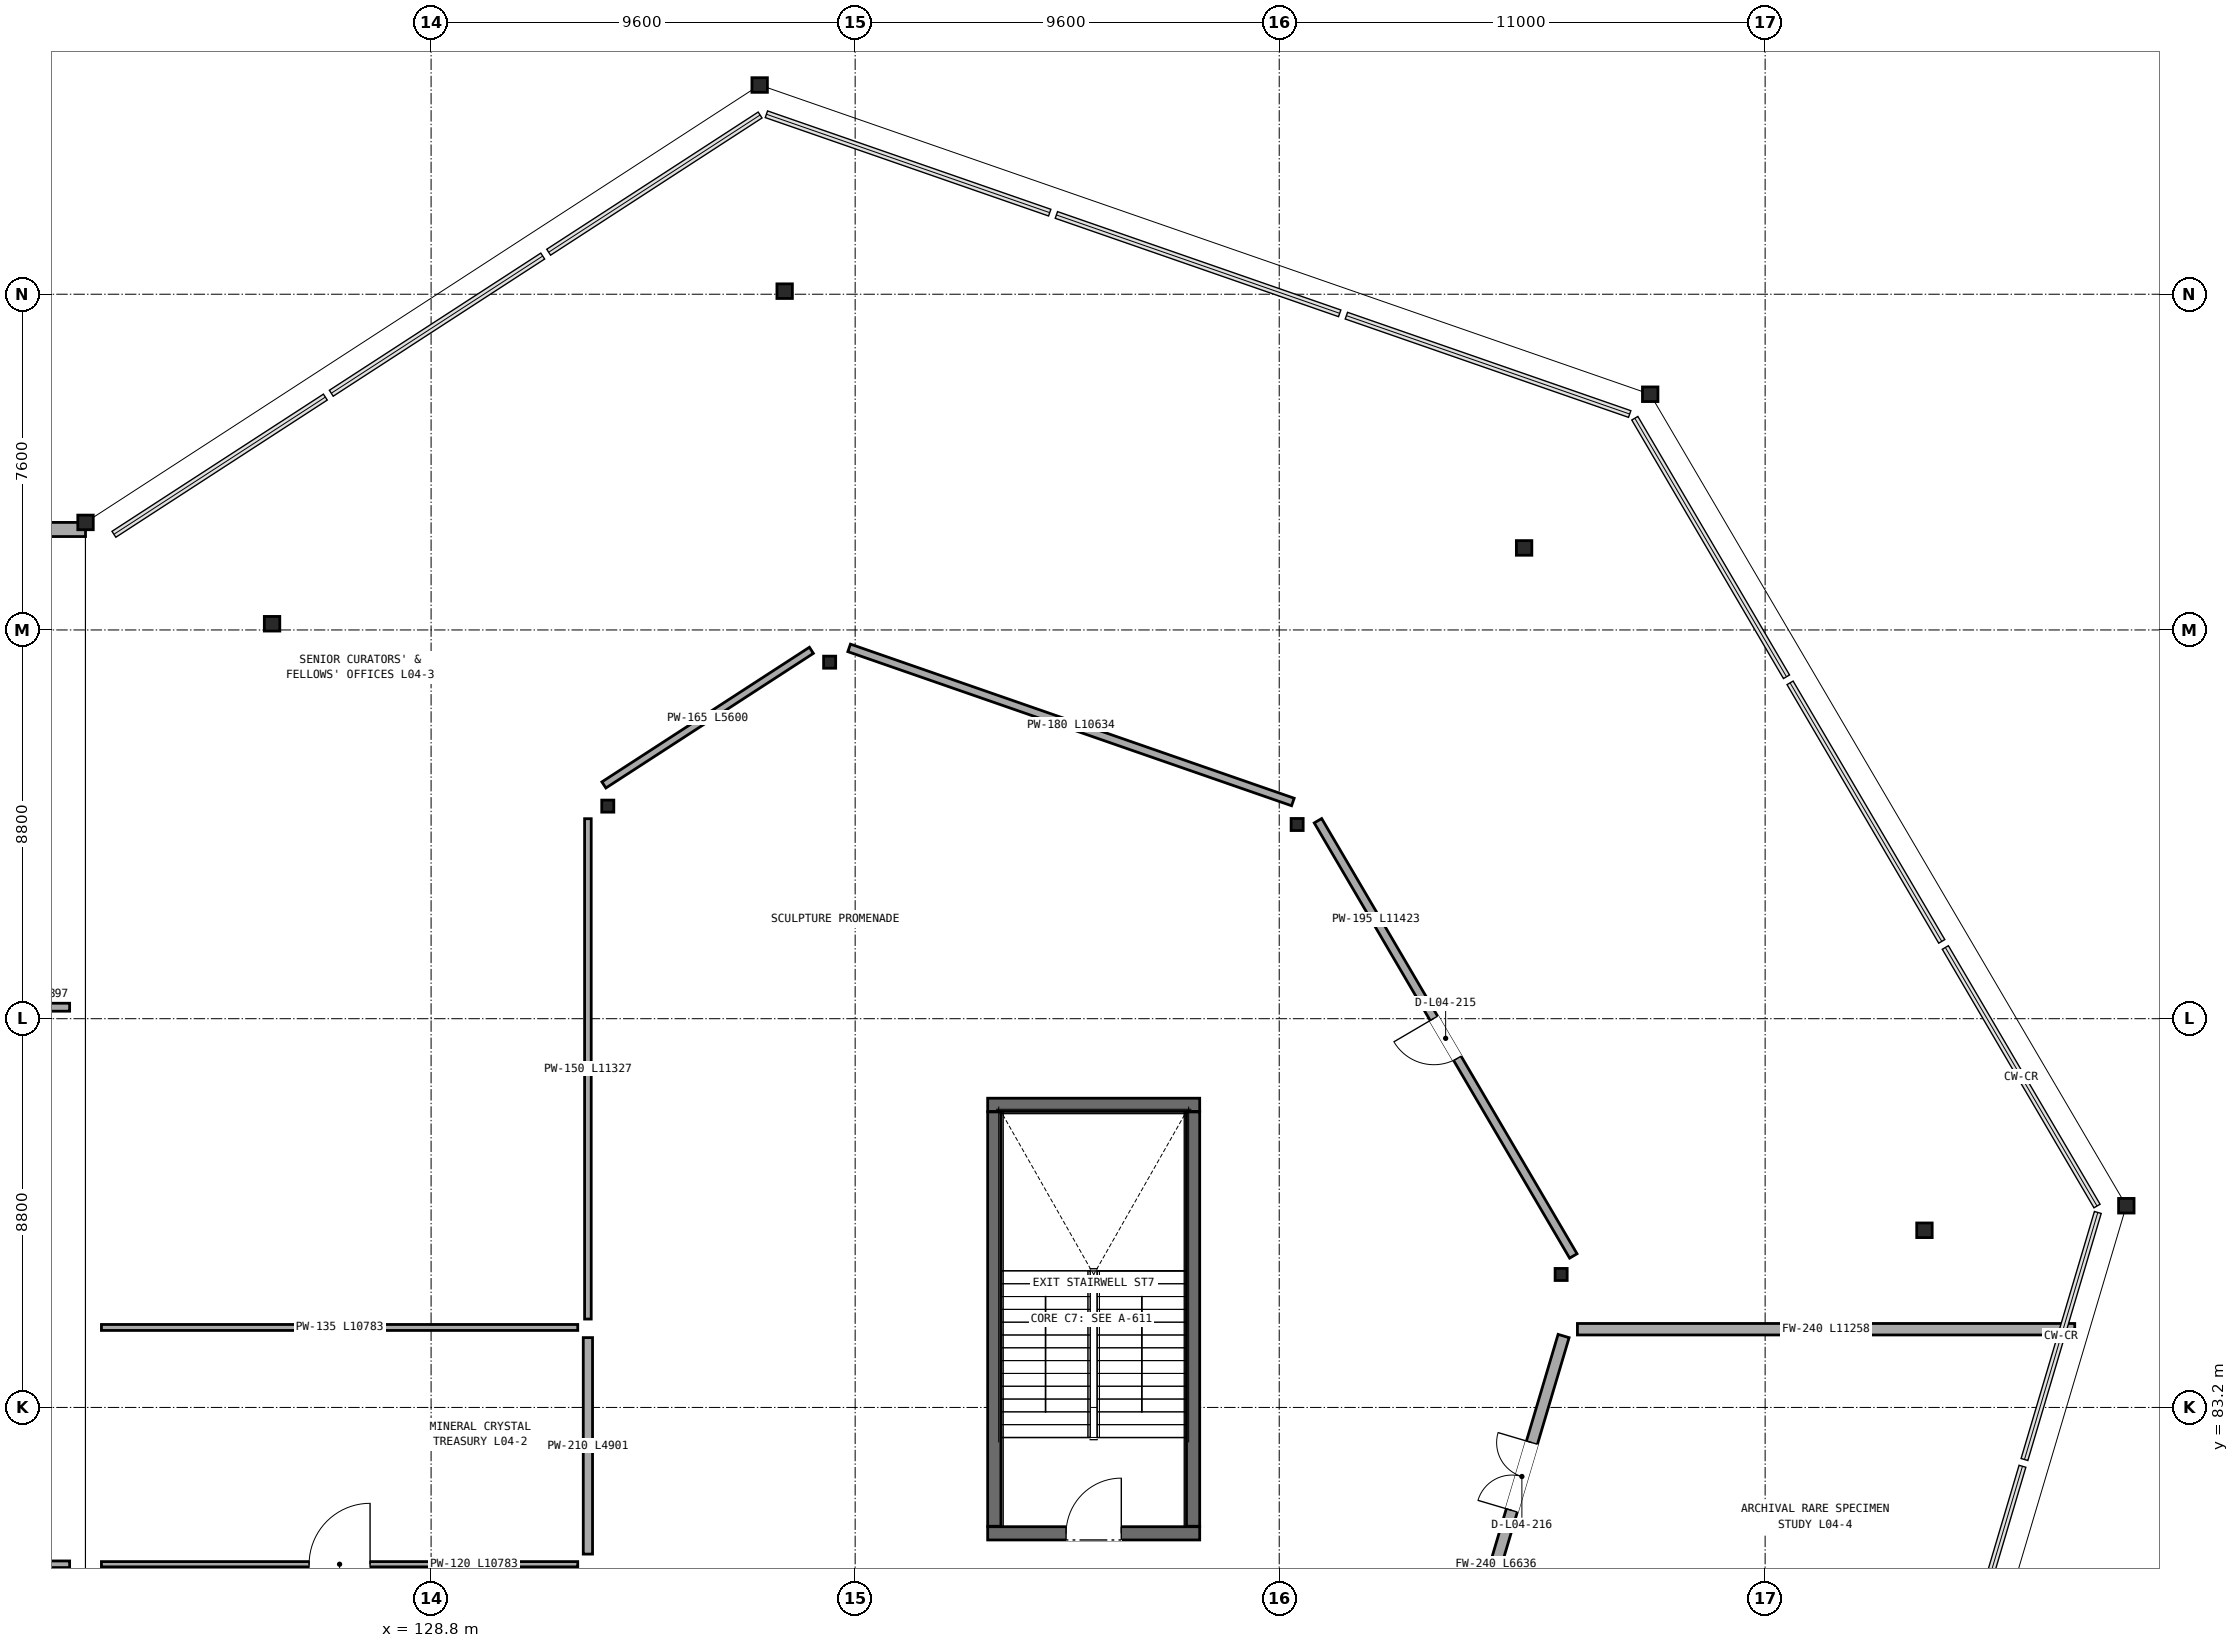
"""IFC4 building model, lengths in metres.
Left out: names, types, materials, properties, quantities, classifications, styles, units other than length and angle.
Written with IfcOpenShell. Run it as: python <this file> out.ifc"""

import sys

from ifc_helpers import new_model, si_unit, direction, frame, frame_2d, origin, origin_2d, place, context, subcontext, project, spatial, rectangle, hollow_circle, i_section, extrude, element, fill, save


model = new_model("IFC4")
c1 = context("Model", 3, precision=1e-05, world=origin(), true_north=direction((0.0, 1.0)))
c2 = subcontext(c1, "Body", "Model", "MODEL_VIEW")
j1 = project(units=[si_unit("LENGTHUNIT", "METRE"), si_unit("PLANEANGLEUNIT", "RADIAN")], contexts=[c1])
p1 = place(None, origin())
s1 = spatial("IfcSite", under=j1, at=p1, CompositionType="ELEMENT")
p2 = place(p1, origin())
s2 = spatial("IfcBuilding", under=s1, at=p2, CompositionType="ELEMENT")
p3 = place(p2, frame((0.0, 0.0, 19.1)))
s3 = spatial("IfcBuildingStorey", under=s2, at=p3, CompositionType="ELEMENT", Elevation=19.1)
p4 = place(p3, frame((167.177, 87.766, 0.0), z_axis=(-0.141024604675, -0.017158172579, 0.989857392754), x_axis=(0.12077728174, -0.992679630201, 0.0)))
e1 = element("IfcColumn", 1, at=p4, inside=s3, PredefinedType="COLUMN", context=c2, shape_type="SweptSolid", body=[
    extrude(i_section(OverallWidth=0.35, OverallDepth=0.331, WebThickness=0.02, FlangeThickness=0.028, at=origin_2d()), origin(), (0.0, 0.0, 1.0), 9.092),
])
p5 = place(p3, frame((162.607, 87.21, 0.0), z_axis=(0.0, 0.0, 1.0), x_axis=(1.0, 0.0, 0.0)))
e2 = element("IfcColumn", 2, at=p5, inside=s3, PredefinedType="COLUMN", context=c2, shape_type="SweptSolid", body=[
    extrude(i_section(OverallWidth=0.35, OverallDepth=0.331, WebThickness=0.02, FlangeThickness=0.028, at=origin_2d()), origin(), (0.0, 0.0, 1.0), 9.0),
])
p6 = place(p3, frame((154.382, 86.21, 0.0), z_axis=(0.0, 0.0, 1.0), x_axis=(1.0, 0.0, 0.0)))
e3 = element("IfcColumn", 3, at=p6, inside=s3, PredefinedType="COLUMN", context=c2, shape_type="SweptSolid", body=[
    extrude(hollow_circle(Radius=0.136, WallThickness=0.009, at=origin_2d()), origin(), (0.0, 0.0, 1.0), 9.0),
])
p7 = place(p3, frame((156.398, 106.136, 0.0), z_axis=(-0.088139600874, -0.107400830324, 0.990301202869), x_axis=(0.773017451422, -0.634384756908, 0.0)))
e4 = element("IfcColumn", 4, at=p7, inside=s3, PredefinedType="COLUMN", context=c2, shape_type="SweptSolid", body=[
    extrude(i_section(OverallWidth=0.35, OverallDepth=0.331, WebThickness=0.02, FlangeThickness=0.028, at=origin_2d()), origin(), (0.0, 0.0, 1.0), 9.088),
])
p8 = place(p3, frame((153.544, 102.657, 0.0), z_axis=(0.0, 0.0, 1.0), x_axis=(1.0, 0.0, 0.0)))
e5 = element("IfcColumn", 5, at=p8, inside=s3, PredefinedType="COLUMN", context=c2, shape_type="SweptSolid", body=[
    extrude(i_section(OverallWidth=0.35, OverallDepth=0.331, WebThickness=0.02, FlangeThickness=0.028, at=origin_2d()), origin(), (0.0, 0.0, 1.0), 9.0),
])
p9 = place(p3, frame((148.406, 96.396, 0.0), z_axis=(0.0, 0.0, 1.0), x_axis=(1.0, 0.0, 0.0)))
e6 = element("IfcColumn", 6, at=p9, inside=s3, PredefinedType="COLUMN", context=c2, shape_type="SweptSolid", body=[
    extrude(hollow_circle(Radius=0.136, WallThickness=0.009, at=origin_2d()), origin(), (0.0, 0.0, 1.0), 9.0),
])
p10 = place(p3, frame((136.238, 113.136, 0.0), z_axis=(0.017445974662, -0.143969550907, 0.989428323013), x_axis=(0.99273780119, 0.120298204842, 0.0)))
e7 = element("IfcColumn", 7, at=p10, inside=s3, PredefinedType="COLUMN", context=c2, shape_type="SweptSolid", body=[
    extrude(i_section(OverallWidth=0.35, OverallDepth=0.331, WebThickness=0.02, FlangeThickness=0.028, at=origin_2d()), origin(), (0.0, 0.0, 1.0), 9.096),
])
p11 = place(p3, frame((136.804, 108.469, 0.0), z_axis=(0.0, 0.0, 1.0), x_axis=(1.0, 0.0, 0.0)))
e8 = element("IfcColumn", 8, at=p11, inside=s3, PredefinedType="COLUMN", context=c2, shape_type="SweptSolid", body=[
    extrude(i_section(OverallWidth=0.35, OverallDepth=0.331, WebThickness=0.02, FlangeThickness=0.028, at=origin_2d()), origin(), (0.0, 0.0, 1.0), 9.0),
])
p12 = place(p3, frame((137.823, 100.071, 0.0), z_axis=(0.0, 0.0, 1.0), x_axis=(1.0, 0.0, 0.0)))
e9 = element("IfcColumn", 9, at=p12, inside=s3, PredefinedType="COLUMN", context=c2, shape_type="SweptSolid", body=[
    extrude(hollow_circle(Radius=0.136, WallThickness=0.009, at=origin_2d()), origin(), (0.0, 0.0, 1.0), 9.0),
])
p13 = place(p3, frame((120.977, 103.235, 0.0), z_axis=(0.130192895734, -0.0707435949, 0.988961654303), x_axis=(0.477443433192, 0.878662488161, 0.0)))
e10 = element("IfcColumn", 10, at=p13, inside=s3, PredefinedType="COLUMN", context=c2, shape_type="SweptSolid", body=[
    extrude(i_section(OverallWidth=0.35, OverallDepth=0.331, WebThickness=0.02, FlangeThickness=0.028, at=origin_2d()), origin(), (0.0, 0.0, 1.0), 9.1),
])
p14 = place(p3, frame((125.2, 100.941, 0.0), z_axis=(0.0, 0.0, 1.0), x_axis=(1.0, 0.0, 0.0)))
e11 = element("IfcColumn", 11, at=p14, inside=s3, PredefinedType="COLUMN", context=c2, shape_type="SweptSolid", body=[
    extrude(i_section(OverallWidth=0.35, OverallDepth=0.331, WebThickness=0.02, FlangeThickness=0.028, at=origin_2d()), origin(), (0.0, 0.0, 1.0), 9.0),
])
p15 = place(p3, frame((132.8, 96.812, 0.0), z_axis=(0.0, 0.0, 1.0), x_axis=(1.0, 0.0, 0.0)))
e12 = element("IfcColumn", 12, at=p15, inside=s3, PredefinedType="COLUMN", context=c2, shape_type="SweptSolid", body=[
    extrude(hollow_circle(Radius=0.136, WallThickness=0.009, at=origin_2d()), origin(), (0.0, 0.0, 1.0), 9.0),
])
p16 = place(p3, frame((120.977, 103.074, 0.0), z_axis=(0.0, 0.0, 1.0), x_axis=(-1.0, 0.0, 0.0)))
e13 = element("IfcWall", 13, at=p16, inside=s3, PredefinedType="STANDARD", context=c2, shape_type="SweptSolid", body=[
    extrude(rectangle(XDim=1.777, YDim=0.32, at=frame_2d((0.889, 0.0))), origin(), (0.0, 0.0, 1.0), 8.278),
])
p17 = place(p3, frame((141.4, 80.35, 0.0), z_axis=(0.0, 0.0, 1.0), x_axis=(1.0, 0.0, 0.0)))
e14 = element("IfcWall", 14, at=p17, inside=s3, PredefinedType="SHEAR", context=c2, shape_type="SweptSolid", body=[
    extrude(rectangle(XDim=4.8, YDim=0.3, at=frame_2d((2.4, 0.0))), origin(), (0.0, 0.0, 1.0), 8.735),
])
p18 = place(p17, frame((1.775, 0.0, 0.0)))
e15 = element("IfcOpeningElement", 15, at=p18, cuts=e14, PredefinedType="OPENING", context=c2, shape_type="SweptSolid", body=[
    extrude(rectangle(XDim=1.25, YDim=2.2, at=frame_2d((0.625, 1.1))), frame((0.0, 0.16, 0.0), z_axis=(0.0, -1.0, 0.0), x_axis=(1.0, 0.0, 0.0)), (0.0, 0.0, 1.0), 0.32),
])
p19 = place(p3, frame((146.2, 90.05, 0.0), z_axis=(0.0, 0.0, 1.0), x_axis=(-1.0, 0.0, 0.0)))
e16 = element("IfcWall", 16, at=p19, inside=s3, PredefinedType="SHEAR", context=c2, shape_type="SweptSolid", body=[
    extrude(rectangle(XDim=4.8, YDim=0.3, at=frame_2d((2.4, 0.0))), origin(), (0.0, 0.0, 1.0), 8.735),
])
for number, where, z_axis, x_axis in (
    (17, (146.05, 80.51, 0.0), (0.0, 0.0, 1.0), (0.0, 1.0, 0.0)),
    (18, (141.55, 89.89, 0.0), (0.0, 0.0, 1.0), (0.0, -1.0, 0.0)),
):
    element("IfcWall", number, at=place(p3, frame(where, z_axis=z_axis, x_axis=x_axis)), inside=s3, PredefinedType="SHEAR", context=c2, shape_type="SweptSolid", body=[
        extrude(rectangle(XDim=9.38, YDim=0.3, at=frame_2d((4.69, 0.0))), origin(), (0.0, 0.0, 1.0), 8.735),
    ])
p20 = place(p3, frame((132.12, 79.65, 0.0), z_axis=(0.0, 0.0, 1.0), x_axis=(-1.0, 0.0, 0.0)))
e19 = element("IfcWall", 19, at=p20, inside=s3, PredefinedType="PARTITIONING", context=c2, shape_type="SweptSolid", body=[
    extrude(rectangle(XDim=10.783, YDim=0.12, at=frame_2d((5.391, 0.0))), origin(), (0.0, 0.0, 1.0), 8.01),
])
p21 = place(p20, frame((4.701, 0.0, 0.0)))
e20 = element("IfcOpeningElement", 20, at=p21, cuts=e19, PredefinedType="OPENING", context=c2, shape_type="SweptSolid", body=[
    extrude(rectangle(XDim=1.38, YDim=2.34, at=frame_2d((0.69, 1.17))), frame((0.0, 0.07, 0.0), z_axis=(0.0, -1.0, 0.0), x_axis=(1.0, 0.0, 0.0)), (0.0, 0.0, 1.0), 0.14),
])
p22 = place(p3, frame((132.35, 84.781, 0.0), z_axis=(0.0, 0.0, 1.0), x_axis=(0.0, -1.0, 0.0)))
e21 = element("IfcWall", 21, at=p22, inside=s3, PredefinedType="PARTITIONING", context=c2, shape_type="SweptSolid", body=[
    extrude(rectangle(XDim=4.901, YDim=0.21, at=frame_2d((2.45, 0.0))), origin(), (0.0, 0.0, 1.0), 8.63),
])
p23 = place(p3, frame((154.658, 86.629, 0.0), z_axis=(0.0, 0.0, 1.0), x_axis=(-0.506044714384, 0.862507244633, 0.0)))
e22 = element("IfcWall", 22, at=p23, inside=s3, PredefinedType="PARTITIONING", context=c2, shape_type="SweptSolid", body=[
    extrude(rectangle(XDim=11.423, YDim=0.195, at=frame_2d((5.712, 0.0))), origin(), (0.0, 0.0, 1.0), 7.91),
])
p24 = place(p23, frame((5.187, 0.0, 0.0)))
e23 = element("IfcOpeningElement", 23, at=p24, cuts=e22, PredefinedType="OPENING", context=c2, shape_type="SweptSolid", body=[
    extrude(rectangle(XDim=1.05, YDim=2.15, at=frame_2d((0.525, 1.075))), frame((0.0, 0.107, 0.0), z_axis=(0.0, -1.0, 0.0), x_axis=(1.0, 0.0, 0.0)), (0.0, 0.0, 1.0), 0.215),
])
p25 = place(p3, frame((148.309, 96.906, 0.0), z_axis=(0.0, 0.0, 1.0), x_axis=(-0.944672280914, 0.328015672907, 0.0)))
e24 = element("IfcWall", 24, at=p25, inside=s3, PredefinedType="PARTITIONING", context=c2, shape_type="SweptSolid", body=[
    extrude(rectangle(XDim=10.634, YDim=0.18, at=frame_2d((5.317, 0.0))), origin(), (0.0, 0.0, 1.0), 8.63),
])
p26 = place(p3, frame((137.409, 100.339, 0.0), z_axis=(0.0, 0.0, 1.0), x_axis=(-0.838914477988, -0.544263262238, 0.0)))
e25 = element("IfcWall", 25, at=p26, inside=s3, PredefinedType="PARTITIONING", context=c2, shape_type="SweptSolid", body=[
    extrude(rectangle(XDim=5.6, YDim=0.165, at=frame_2d((2.8, 0.0))), origin(), (0.0, 0.0, 1.0), 8.63),
])
p27 = place(p3, frame((132.35, 96.527, 0.0), z_axis=(0.0, 0.0, 1.0), x_axis=(0.0, -1.0, 0.0)))
e26 = element("IfcWall", 26, at=p27, inside=s3, PredefinedType="PARTITIONING", context=c2, shape_type="SweptSolid", body=[
    extrude(rectangle(XDim=11.327, YDim=0.15, at=frame_2d((5.663, 0.0))), origin(), (0.0, 0.0, 1.0), 8.63),
])
p28 = place(p3, frame((152.549, 78.456, 0.0), z_axis=(0.0, 0.0, 1.0), x_axis=(0.284585608929, 0.958650630413, 0.0)))
e27 = element("IfcWall", 27, at=p28, inside=s3, PredefinedType="SOLIDWALL", context=c2, shape_type="SweptSolid", body=[
    extrude(rectangle(XDim=6.636, YDim=0.26, at=frame_2d((3.318, 0.0))), origin(), (0.0, 0.0, 1.0), 8.63),
])
p29 = place(p28, frame((2.518, 0.0, 0.0)))
e28 = element("IfcOpeningElement", 28, at=p29, cuts=e27, PredefinedType="OPENING", context=c2, shape_type="SweptSolid", body=[
    extrude(rectangle(XDim=1.6, YDim=2.4, at=frame_2d((0.8, 1.2))), frame((0.0, 0.14, 0.0), z_axis=(0.0, -1.0, 0.0), x_axis=(1.0, 0.0, 0.0)), (0.0, 0.0, 1.0), 0.28),
])
p30 = place(p3, frame((120.617, 79.65, 0.0), z_axis=(0.0, 0.0, 1.0), x_axis=(-1.0, 0.0, 0.0)))
e29 = element("IfcWall", 29, at=p30, inside=s3, PredefinedType="PARTITIONING", context=c2, shape_type="SweptSolid", body=[
    extrude(rectangle(XDim=10.567, YDim=0.15, at=frame_2d((5.284, 0.0))), origin(), (0.0, 0.0, 1.0), 8.263),
])
p31 = place(p3, frame((121.337, 85.01, 0.0), z_axis=(0.0, 0.0, 1.0), x_axis=(1.0, 0.0, 0.0)))
e30 = element("IfcWall", 30, at=p31, inside=s3, PredefinedType="PARTITIONING", context=c2, shape_type="SweptSolid", body=[
    extrude(rectangle(XDim=10.783, YDim=0.135, at=frame_2d((5.391, 0.0))), origin(), (0.0, 0.0, 1.0), 8.01),
])
p32 = place(p3, frame((166.009, 84.971, 0.0), z_axis=(0.0, 0.0, 1.0), x_axis=(-1.0, 0.0, 0.0)))
e31 = element("IfcWall", 31, at=p32, inside=s3, PredefinedType="SOLIDWALL", context=c2, shape_type="SweptSolid", body=[
    extrude(rectangle(XDim=11.258, YDim=0.26, at=frame_2d((5.629, 0.0))), origin(), (0.0, 0.0, 1.0), 2.75),
])
p33 = place(p3, frame((118.72, 92.26, 0.0), z_axis=(0.0, 0.0, 1.0), x_axis=(1.0, 0.0, 0.0)))
e32 = element("IfcWall", 32, at=p33, inside=s3, PredefinedType="PARTITIONING", context=c2, shape_type="SweptSolid", body=[
    extrude(rectangle(XDim=1.897, YDim=0.18, at=frame_2d((0.949, 0.0))), origin(), (0.0, 0.0, 1.0), 8.187),
])
p34 = place(p18, origin())
e33 = element("IfcDoor", 33, at=p34, inside=s3, OperationType="SINGLE_SWING_RIGHT", PredefinedType="DOOR", context=c2, shape_type="SweptSolid", body=[
    extrude(rectangle(XDim=1.25, YDim=2.2, at=frame_2d((0.625, 1.1))), frame((0.0, 0.025, 0.0), z_axis=(0.0, -1.0, 0.0), x_axis=(1.0, 0.0, 0.0)), (0.0, 0.0, 1.0), 0.05),
])
fill(e15, e33)
p35 = place(p21, frame((1.38, 0.0, 0.0), z_axis=(0.0, 0.0, 1.0), x_axis=(-1.0, 0.0, 0.0)))
e34 = element("IfcDoor", 34, at=p35, inside=s3, OperationType="SINGLE_SWING_LEFT", PredefinedType="DOOR", context=c2, shape_type="SweptSolid", body=[
    extrude(rectangle(XDim=1.38, YDim=2.34, at=frame_2d((0.69, 1.17))), frame((0.0, 0.025, 0.0), z_axis=(0.0, -1.0, 0.0), x_axis=(1.0, 0.0, 0.0)), (0.0, 0.0, 1.0), 0.05),
])
fill(e20, e34)
p36 = place(p24, origin())
e35 = element("IfcDoor", 35, at=p36, inside=s3, OperationType="SINGLE_SWING_RIGHT", PredefinedType="DOOR", context=c2, shape_type="SweptSolid", body=[
    extrude(rectangle(XDim=1.05, YDim=2.15, at=frame_2d((0.525, 1.075))), frame((0.0, 0.025, 0.0), z_axis=(0.0, -1.0, 0.0), x_axis=(1.0, 0.0, 0.0)), (0.0, 0.0, 1.0), 0.05),
])
fill(e23, e35)
p37 = place(p29, origin())
e36 = element("IfcDoor", 36, at=p37, inside=s3, OperationType="DOUBLE_DOOR_SINGLE_SWING", PredefinedType="DOOR", context=c2, shape_type="SweptSolid", body=[
    extrude(rectangle(XDim=1.6, YDim=2.4, at=frame_2d((0.8, 1.2))), frame((0.0, 0.025, 0.0), z_axis=(0.0, -1.0, 0.0), x_axis=(1.0, 0.0, 0.0)), (0.0, 0.0, 1.0), 0.05),
])
fill(e28, e36)
save(model, sys.argv[1])
